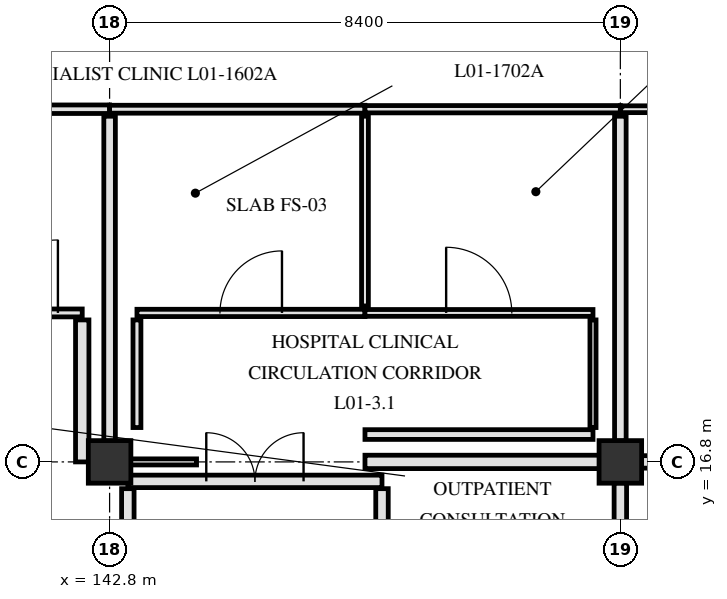
"""IFC4 building model, lengths in metres.
Left out: names, types, materials, properties, quantities, classifications, styles, units other than length and angle.
Written with IfcOpenShell. Run it as: python <this file> out.ifc"""

import sys

from ifc_helpers import new_model, si_unit, direction, frame, frame_2d, origin, origin_2d, place, context, subcontext, project, spatial, rectangle, extrude, element, fill, save


model = new_model("IFC4")
c1 = context("Model", 3, precision=1e-05, world=origin(), true_north=direction((0.0, 1.0)))
c2 = subcontext(c1, "Body", "Model", "MODEL_VIEW")
j1 = project(units=[si_unit("LENGTHUNIT", "METRE"), si_unit("PLANEANGLEUNIT", "RADIAN")], contexts=[c1])
p1 = place(None, origin())
s1 = spatial("IfcSite", under=j1, at=p1, CompositionType="ELEMENT")
p2 = place(p1, origin())
s2 = spatial("IfcBuilding", under=s1, at=p2, CompositionType="ELEMENT")
p3 = place(p2, frame((0.0, 0.0, 4.8)))
s3 = spatial("IfcBuildingStorey", under=s2, at=p3, CompositionType="ELEMENT", Elevation=4.8)
for number, where, z_axis, x_axis in (
    (1, (142.8, 16.8, 0.0), (0.0, 0.0, 1.0), (1.0, 0.0, 0.0)),
    (2, (151.2, 16.8, 0.0), (0.0, 0.0, 1.0), (1.0, 0.0, 0.0)),
):
    element("IfcColumn", number, at=place(p3, frame(where, z_axis=z_axis, x_axis=x_axis)), inside=s3, PredefinedType="COLUMN", context=c2, shape_type="SweptSolid", body=[
        extrude(rectangle(XDim=0.7, YDim=0.7, at=origin_2d()), origin(), (0.0, 0.0, 1.0), 4.5),
    ])
p4 = place(p3, frame((147.28, 12.24, 0.0), z_axis=(0.0, 0.0, 1.0), x_axis=(0.0, 1.0, 0.0)))
e3 = element("IfcWall", 3, at=p4, inside=s3, PredefinedType="PARTITIONING", context=c2, shape_type="SweptSolid", body=[
    extrude(rectangle(XDim=4.12, YDim=0.205, at=frame_2d((2.06, 0.0))), origin(), (0.0, 0.0, 1.0), 4.14),
])
p5 = place(p3, frame((143.1, 12.24, 0.0), z_axis=(0.0, 0.0, 1.0), x_axis=(0.0, 1.0, 0.0)))
e4 = element("IfcWall", 4, at=p5, inside=s3, PredefinedType="PARTITIONING", context=c2, shape_type="SweptSolid", body=[
    extrude(rectangle(XDim=4.12, YDim=0.205, at=frame_2d((2.06, 0.0))), origin(), (0.0, 0.0, 1.0), 3.59),
])
p6 = place(p3, frame((143.1, 16.48, 0.0), z_axis=(0.0, 0.0, 1.0), x_axis=(1.0, 0.0, 0.0)))
e5 = element("IfcWall", 5, at=p6, inside=s3, PredefinedType="PARTITIONING", context=c2, shape_type="SweptSolid", body=[
    extrude(rectangle(XDim=4.18, YDim=0.205, at=frame_2d((2.09, 0.0))), origin(), (0.0, 0.0, 1.0), 3.54),
])
p7 = place(p6, frame((1.29, 0.0, 0.0)))
e6 = element("IfcOpeningElement", 6, at=p7, cuts=e5, PredefinedType="OPENING", context=c2, shape_type="SweptSolid", body=[
    extrude(rectangle(XDim=1.6, YDim=2.25, at=frame_2d((0.8, 1.125))), frame((0.0, 0.113, 0.0), z_axis=(0.0, -1.0, 0.0), x_axis=(1.0, 0.0, 0.0)), (0.0, 0.0, 1.0), 0.225),
])
p8 = place(p3, frame((143.145, 16.8, 0.0), z_axis=(0.0, 0.0, 1.0), x_axis=(1.0, 0.0, 0.0)))
e7 = element("IfcWall", 7, at=p8, inside=s3, PredefinedType="PARTITIONING", context=c2, shape_type="SweptSolid", body=[
    extrude(rectangle(XDim=1.085, YDim=0.1, at=frame_2d((0.542, 0.0))), origin(), (0.0, 0.0, 1.0), 3.54),
])
p9 = place(p3, frame((147.0, 16.8, 0.0), z_axis=(0.0, 0.0, 1.0), x_axis=(1.0, 0.0, 0.0)))
e8 = element("IfcWall", 8, at=p9, inside=s3, PredefinedType="PARTITIONING", context=c2, shape_type="SweptSolid", body=[
    extrude(rectangle(XDim=3.855, YDim=0.22, at=frame_2d((1.927, 0.0))), origin(), (0.0, 0.0, 1.0), 3.54),
])
p10 = place(p3, frame((151.545, 16.8, 0.0), z_axis=(0.0, 0.0, 1.0), x_axis=(1.0, 0.0, 0.0)))
e9 = element("IfcWall", 9, at=p10, inside=s3, PredefinedType="PARTITIONING", context=c2, shape_type="SweptSolid", body=[
    extrude(rectangle(XDim=3.855, YDim=0.205, at=frame_2d((1.927, 0.0))), origin(), (0.0, 0.0, 1.0), 3.54),
])
p11 = place(p3, frame((147.0, 17.25, 0.0), z_axis=(0.0, 0.0, 1.0), x_axis=(1.0, 0.0, 0.0)))
e10 = element("IfcWall", 10, at=p11, inside=s3, PredefinedType="PARTITIONING", context=c2, shape_type="SweptSolid", body=[
    extrude(rectangle(XDim=3.75, YDim=0.16, at=frame_2d((1.875, 0.0))), origin(), (0.0, 0.0, 1.0), 4.14),
])
p12 = place(p3, frame((140.35, 19.25, 0.0), z_axis=(0.0, 0.0, 1.0), x_axis=(1.0, 0.0, 0.0)))
e11 = element("IfcWall", 11, at=p12, inside=s3, PredefinedType="PARTITIONING", context=c2, shape_type="SweptSolid", body=[
    extrude(rectangle(XDim=2.0, YDim=0.13, at=frame_2d((1.0, 0.0))), origin(), (0.0, 0.0, 1.0), 4.14),
])
p13 = place(p12, frame((0.4, 0.0, 0.0)))
e12 = element("IfcOpeningElement", 12, at=p13, cuts=e11, PredefinedType="OPENING", context=c2, shape_type="SweptSolid", body=[
    extrude(rectangle(XDim=1.2, YDim=2.15, at=frame_2d((0.6, 1.075))), frame((0.0, 0.075, 0.0), z_axis=(0.0, -1.0, 0.0), x_axis=(1.0, 0.0, 0.0)), (0.0, 0.0, 1.0), 0.15),
])
p14 = place(p3, frame((143.25, 19.25, 0.0), z_axis=(0.0, 0.0, 1.0), x_axis=(1.0, 0.0, 0.0)))
e13 = element("IfcWall", 13, at=p14, inside=s3, PredefinedType="PARTITIONING", context=c2, shape_type="SweptSolid", body=[
    extrude(rectangle(XDim=3.75, YDim=0.12, at=frame_2d((1.875, 0.0))), origin(), (0.0, 0.0, 1.0), 4.14),
])
p15 = place(p14, frame((1.365, 0.0, 0.0)))
e14 = element("IfcOpeningElement", 14, at=p15, cuts=e13, PredefinedType="OPENING", context=c2, shape_type="SweptSolid", body=[
    extrude(rectangle(XDim=1.02, YDim=2.12, at=frame_2d((0.51, 1.06))), frame((0.0, 0.07, 0.0), z_axis=(0.0, -1.0, 0.0), x_axis=(1.0, 0.0, 0.0)), (0.0, 0.0, 1.0), 0.14),
])
p16 = place(p3, frame((147.0, 19.25, 0.0), z_axis=(0.0, 0.0, 1.0), x_axis=(1.0, 0.0, 0.0)))
e15 = element("IfcWall", 15, at=p16, inside=s3, PredefinedType="PARTITIONING", context=c2, shape_type="SweptSolid", body=[
    extrude(rectangle(XDim=3.75, YDim=0.112, at=frame_2d((1.875, 0.0))), origin(), (0.0, 0.0, 1.0), 4.14),
])
p17 = place(p16, frame((1.335, 0.0, 0.0)))
e16 = element("IfcOpeningElement", 16, at=p17, cuts=e15, PredefinedType="OPENING", context=c2, shape_type="SweptSolid", body=[
    extrude(rectangle(XDim=1.08, YDim=2.12, at=frame_2d((0.54, 1.06))), frame((0.0, 0.066, 0.0), z_axis=(0.0, -1.0, 0.0), x_axis=(1.0, 0.0, 0.0)), (0.0, 0.0, 1.0), 0.132),
])
p18 = place(p3, frame((138.6, 22.6, 0.0), z_axis=(0.0, 0.0, 1.0), x_axis=(1.0, 0.0, 0.0)))
e17 = element("IfcWall", 17, at=p18, inside=s3, PredefinedType="PARTITIONING", context=c2, shape_type="SweptSolid", body=[
    extrude(rectangle(XDim=4.2, YDim=0.14, at=frame_2d((2.1, 0.0))), origin(), (0.0, 0.0, 1.0), 3.59),
])
p19 = place(p3, frame((142.8, 22.6, 0.0), z_axis=(0.0, 0.0, 1.0), x_axis=(1.0, 0.0, 0.0)))
e18 = element("IfcWall", 18, at=p19, inside=s3, PredefinedType="PARTITIONING", context=c2, shape_type="SweptSolid", body=[
    extrude(rectangle(XDim=4.2, YDim=0.13, at=frame_2d((2.1, 0.0))), origin(), (0.0, 0.0, 1.0), 3.59),
])
p20 = place(p3, frame((147.0, 22.6, 0.0), z_axis=(0.0, 0.0, 1.0), x_axis=(1.0, 0.0, 0.0)))
e19 = element("IfcWall", 19, at=p20, inside=s3, PredefinedType="PARTITIONING", context=c2, shape_type="SweptSolid", body=[
    extrude(rectangle(XDim=4.2, YDim=0.12, at=frame_2d((2.1, 0.0))), origin(), (0.0, 0.0, 1.0), 3.59),
])
p21 = place(p3, frame((151.2, 22.6, 0.0), z_axis=(0.0, 0.0, 1.0), x_axis=(1.0, 0.0, 0.0)))
e20 = element("IfcWall", 20, at=p21, inside=s3, PredefinedType="PARTITIONING", context=c2, shape_type="SweptSolid", body=[
    extrude(rectangle(XDim=4.2, YDim=0.112, at=frame_2d((2.1, 0.0))), origin(), (0.0, 0.0, 1.0), 3.59),
])
p22 = place(p21, frame((1.31, 0.0, 0.0)))
e21 = element("IfcOpeningElement", 21, at=p22, cuts=e20, PredefinedType="OPENING", context=c2, shape_type="SweptSolid", body=[
    extrude(rectangle(XDim=1.58, YDim=2.22, at=frame_2d((0.79, 1.11))), frame((0.0, 0.066, 0.0), z_axis=(0.0, -1.0, 0.0), x_axis=(1.0, 0.0, 0.0)), (0.0, 0.0, 1.0), 0.132),
])
p23 = place(p3, frame((142.35, 16.8, 0.0), z_axis=(0.0, 0.0, 1.0), x_axis=(0.0, 1.0, 0.0)))
e22 = element("IfcWall", 22, at=p23, inside=s3, PredefinedType="PARTITIONING", context=c2, shape_type="SweptSolid", body=[
    extrude(rectangle(XDim=2.335, YDim=0.22, at=frame_2d((1.167, 0.0))), origin(), (0.0, 0.0, 1.0), 3.54),
])
p24 = place(p3, frame((142.8, 17.145, 0.0), z_axis=(0.0, 0.0, 1.0), x_axis=(0.0, 1.0, 0.0)))
e23 = element("IfcWall", 23, at=p24, inside=s3, PredefinedType="PARTITIONING", context=c2, shape_type="SweptSolid", body=[
    extrude(rectangle(XDim=5.34, YDim=0.19, at=frame_2d((2.67, 0.0))), origin(), (0.0, 0.0, 1.0), 3.59),
])
p25 = place(p3, frame((143.25, 17.365, 0.0), z_axis=(0.0, 0.0, 1.0), x_axis=(0.0, 1.0, 0.0)))
e24 = element("IfcWall", 24, at=p25, inside=s3, PredefinedType="PARTITIONING", context=c2, shape_type="SweptSolid", body=[
    extrude(rectangle(XDim=1.77, YDim=0.13, at=frame_2d((0.885, 0.0))), origin(), (0.0, 0.0, 1.0), 4.14),
])
p26 = place(p3, frame((147.0, 19.365, 0.0), z_axis=(0.0, 0.0, 1.0), x_axis=(0.0, 1.0, 0.0)))
e25 = element("IfcWall", 25, at=p26, inside=s3, PredefinedType="PARTITIONING", context=c2, shape_type="SweptSolid", body=[
    extrude(rectangle(XDim=3.12, YDim=0.112, at=frame_2d((1.56, 0.0))), origin(), (0.0, 0.0, 1.0), 4.14),
])
p27 = place(p3, frame((150.75, 17.365, 0.0), z_axis=(0.0, 0.0, 1.0), x_axis=(0.0, 1.0, 0.0)))
e26 = element("IfcWall", 26, at=p27, inside=s3, PredefinedType="PARTITIONING", context=c2, shape_type="SweptSolid", body=[
    extrude(rectangle(XDim=1.77, YDim=0.1, at=frame_2d((0.885, 0.0))), origin(), (0.0, 0.0, 1.0), 4.14),
])
p28 = place(p3, frame((151.2, 12.1, 0.0), z_axis=(0.0, 0.0, 1.0), x_axis=(0.0, 1.0, 0.0)))
e27 = element("IfcWall", 27, at=p28, inside=s3, PredefinedType="PARTITIONING", context=c2, shape_type="SweptSolid", body=[
    extrude(rectangle(XDim=4.355, YDim=0.205, at=frame_2d((2.177, 0.0))), origin(), (0.0, 0.0, 1.0), 3.59),
])
p29 = place(p3, frame((151.2, 17.145, 0.0), z_axis=(0.0, 0.0, 1.0), x_axis=(0.0, 1.0, 0.0)))
e28 = element("IfcWall", 28, at=p29, inside=s3, PredefinedType="PARTITIONING", context=c2, shape_type="SweptSolid", body=[
    extrude(rectangle(XDim=5.34, YDim=0.19, at=frame_2d((2.67, 0.0))), origin(), (0.0, 0.0, 1.0), 3.59),
])
p30 = place(p7, origin())
e29 = element("IfcDoor", 29, at=p30, inside=s3, OperationType="DOUBLE_SWING_LEFT", PredefinedType="DOOR", context=c2, shape_type="SweptSolid", body=[
    extrude(rectangle(XDim=1.6, YDim=2.25, at=frame_2d((0.8, 1.125))), frame((0.0, 0.025, 0.0), z_axis=(0.0, -1.0, 0.0), x_axis=(1.0, 0.0, 0.0)), (0.0, 0.0, 1.0), 0.05),
])
fill(e6, e29)
p31 = place(p13, origin())
e30 = element("IfcDoor", 30, at=p31, inside=s3, OperationType="SINGLE_SWING_RIGHT", PredefinedType="DOOR", context=c2, shape_type="SweptSolid", body=[
    extrude(rectangle(XDim=1.2, YDim=2.15, at=frame_2d((0.6, 1.075))), frame((0.0, 0.025, 0.0), z_axis=(0.0, -1.0, 0.0), x_axis=(1.0, 0.0, 0.0)), (0.0, 0.0, 1.0), 0.05),
])
fill(e12, e30)
p32 = place(p15, origin())
e31 = element("IfcDoor", 31, at=p32, inside=s3, OperationType="SINGLE_SWING_RIGHT", PredefinedType="DOOR", context=c2, shape_type="SweptSolid", body=[
    extrude(rectangle(XDim=1.02, YDim=2.12, at=frame_2d((0.51, 1.06))), frame((0.0, 0.025, 0.0), z_axis=(0.0, -1.0, 0.0), x_axis=(1.0, 0.0, 0.0)), (0.0, 0.0, 1.0), 0.05),
])
fill(e14, e31)
p33 = place(p17, origin())
e32 = element("IfcDoor", 32, at=p33, inside=s3, OperationType="SINGLE_SWING_LEFT", PredefinedType="DOOR", context=c2, shape_type="SweptSolid", body=[
    extrude(rectangle(XDim=1.08, YDim=2.12, at=frame_2d((0.54, 1.06))), frame((0.0, 0.025, 0.0), z_axis=(0.0, -1.0, 0.0), x_axis=(1.0, 0.0, 0.0)), (0.0, 0.0, 1.0), 0.05),
])
fill(e16, e32)
save(model, sys.argv[1])
